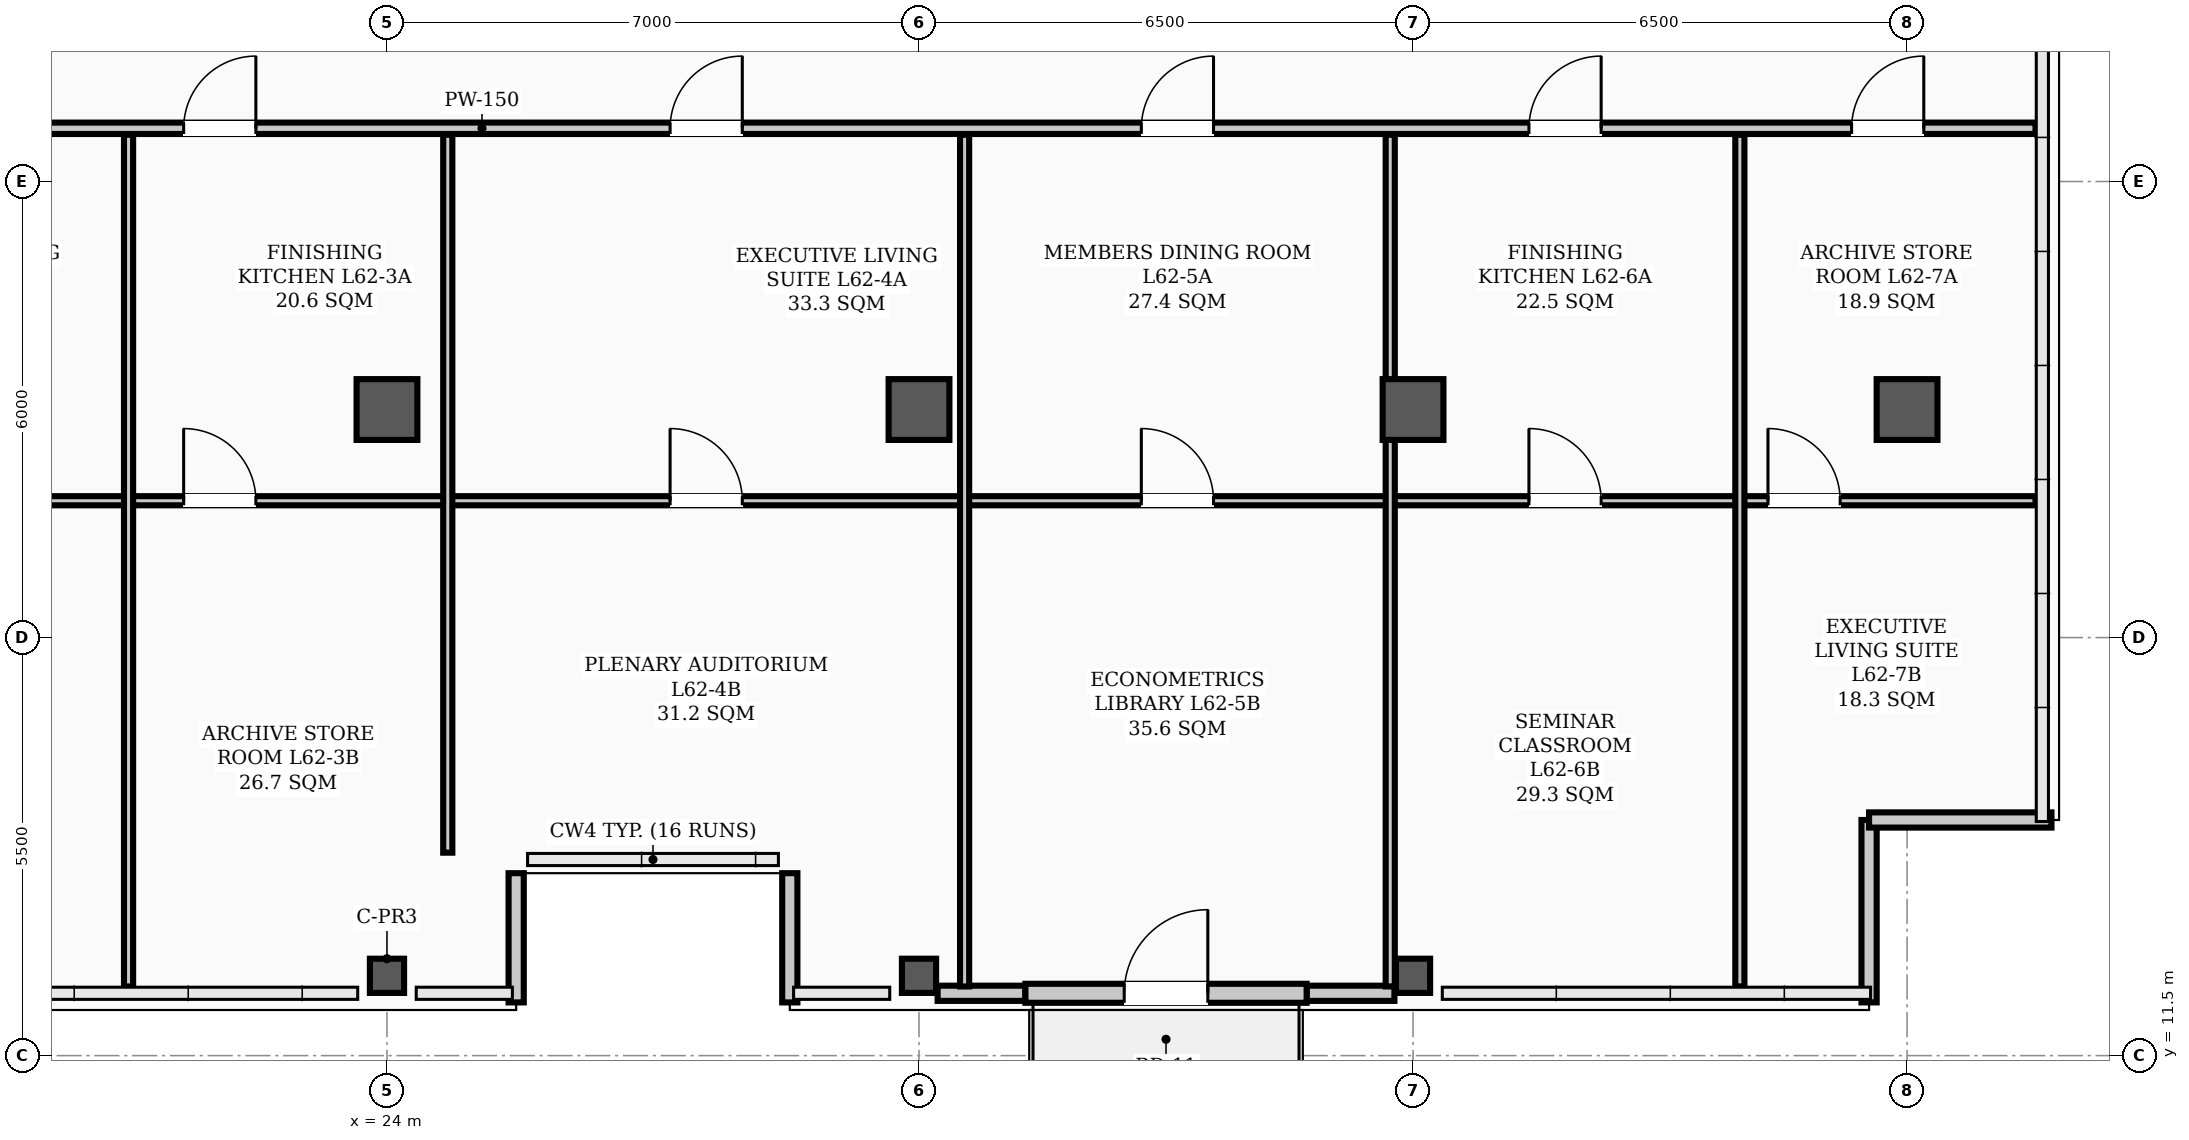
"""IFC4 building model, lengths in metres.
Left out: names, types, materials, properties, quantities, classifications, styles, units other than length and angle.
Written with IfcOpenShell. Run it as: python <this file> out.ifc"""

import sys

from ifc_helpers import new_model, si_unit, direction, frame, frame_2d, origin, origin_2d, place, context, subcontext, project, spatial, rectangle, hollow_rectangle, extrude, element, fill, save


model = new_model("IFC4")
c1 = context("Model", 3, precision=1e-05, world=origin(), true_north=direction((0.0, 1.0)))
c2 = subcontext(c1, "Body", "Model", "MODEL_VIEW")
j1 = project(units=[si_unit("LENGTHUNIT", "METRE"), si_unit("PLANEANGLEUNIT", "RADIAN")], contexts=[c1])
p1 = place(None, origin())
s1 = spatial("IfcSite", under=j1, at=p1, CompositionType="ELEMENT")
p2 = place(p1, origin())
s2 = spatial("IfcBuilding", under=s1, at=p2, CompositionType="ELEMENT")
p3 = place(p2, frame((0.0, 0.0, 250.1)))
s3 = spatial("IfcBuildingStorey", under=s2, at=p3, CompositionType="ELEMENT", Elevation=250.1)
for number, where, z_axis, x_axis in (
    (1, (24.0, 20.0, 0.0), (0.0, 0.0, 1.0), (1.0, 0.0, 0.0)),
    (2, (31.0, 20.0, 0.0), (0.0, 0.0, 1.0), (1.0, 0.0, 0.0)),
    (3, (37.5, 20.0, 0.0), (0.0, 0.0, 1.0), (1.0, 0.0, 0.0)),
    (4, (44.0, 20.0, 0.0), (0.0, 0.0, 1.0), (1.0, 0.0, 0.0)),
):
    element("IfcColumn", number, at=place(p3, frame(where, z_axis=z_axis, x_axis=x_axis)), inside=s3, PredefinedType="COLUMN", context=c2, shape_type="SweptSolid", body=[
        extrude(hollow_rectangle(XDim=0.8, YDim=0.8, WallThickness=0.032, InnerFilletRadius=0.016, OuterFilletRadius=0.048, at=origin_2d()), origin(), (0.0, 0.0, 1.0), 3.9),
    ])
for number, where, z_axis, x_axis in (
    (5, (24.0, 12.55, 0.0), (0.0, 0.0, 1.0), (1.0, 0.0, 0.0)),
    (6, (31.0, 12.55, 0.0), (0.0, 0.0, 1.0), (1.0, 0.0, 0.0)),
    (7, (37.5, 12.55, 0.0), (0.0, 0.0, 1.0), (1.0, 0.0, 0.0)),
):
    element("IfcColumn", number, at=place(p3, frame(where, z_axis=z_axis, x_axis=x_axis)), inside=s3, PredefinedType="COLUMN", context=c2, shape_type="SweptSolid", body=[
        extrude(hollow_rectangle(XDim=0.45, YDim=0.45, WallThickness=0.022, InnerFilletRadius=0.022, OuterFilletRadius=0.044, at=origin_2d()), origin(), (0.0, 0.0, 1.0), 3.9),
    ])
for number, where, z_axis, x_axis in (
    (8, (31.245, 12.32, 0.0), (0.0, 0.0, 1.0), (1.0, 0.0, 0.0)),
    (9, (36.1, 12.32, 0.0), (0.0, 0.0, 1.0), (1.0, 0.0, 0.0)),
):
    element("IfcWall", number, at=place(p3, frame(where, z_axis=z_axis, x_axis=x_axis)), inside=s3, PredefinedType="PARAPET", context=c2, shape_type="SweptSolid", body=[
        extrude(rectangle(XDim=1.155, YDim=0.2, at=frame_2d((0.577, 0.0))), origin(), (0.0, 0.0, 1.0), 1.2),
    ])
p4 = place(p3, frame((43.5, 12.2, 0.0), z_axis=(0.0, 0.0, 1.0), x_axis=(0.0, 1.0, 0.0)))
e10 = element("IfcWall", 10, at=p4, inside=s3, PredefinedType="PARAPET", context=c2, shape_type="SweptSolid", body=[
    extrude(rectangle(XDim=2.4, YDim=0.2, at=frame_2d((1.2, 0.0))), origin(), (0.0, 0.0, 1.0), 1.2),
])
p5 = place(p3, frame((43.5, 14.6, 0.0), z_axis=(0.0, 0.0, 1.0), x_axis=(1.0, 0.0, 0.0)))
e11 = element("IfcWall", 11, at=p5, inside=s3, PredefinedType="PARAPET", context=c2, shape_type="SweptSolid", body=[
    extrude(rectangle(XDim=2.4, YDim=0.2, at=frame_2d((1.2, 0.0))), origin(), (0.0, 0.0, 1.0), 1.2),
])
for number, where, z_axis, x_axis in (
    (12, (25.7, 12.2, 0.0), (0.0, 0.0, 1.0), (0.0, 1.0, 0.0)),
    (13, (29.3, 13.9, 0.0), (0.0, 0.0, 1.0), (0.0, -1.0, 0.0)),
):
    element("IfcWall", number, at=place(p3, frame(where, z_axis=z_axis, x_axis=x_axis)), inside=s3, PredefinedType="PARAPET", context=c2, shape_type="SweptSolid", body=[
        extrude(rectangle(XDim=1.7, YDim=0.2, at=frame_2d((0.85, 0.0))), origin(), (0.0, 0.0, 1.0), 1.2),
    ])
p6 = place(p3, frame((32.4, 12.32, 0.0), z_axis=(0.0, 0.0, 1.0), x_axis=(1.0, 0.0, 0.0)))
e14 = element("IfcWall", 14, at=p6, inside=s3, PredefinedType="STANDARD", context=c2, shape_type="SweptSolid", body=[
    extrude(rectangle(XDim=3.7, YDim=0.25, at=frame_2d((1.85, 0.0))), origin(), (0.0, 0.0, 1.0), 3.18),
])
p7 = place(p6, frame((1.3, 0.0, 0.0)))
e15 = element("IfcOpeningElement", 15, at=p7, cuts=e14, PredefinedType="OPENING", context=c2, shape_type="SweptSolid", body=[
    extrude(rectangle(XDim=1.1, YDim=2.2, at=frame_2d((0.55, 1.1))), frame((0.0, 0.135, 0.0), z_axis=(0.0, -1.0, 0.0), x_axis=(1.0, 0.0, 0.0)), (0.0, 0.0, 1.0), 0.27),
])
p8 = place(p3, frame((4.81, 23.7, 0.0), z_axis=(0.0, 0.0, 1.0), x_axis=(1.0, 0.0, 0.0)))
e16 = element("IfcWall", 16, at=p8, inside=s3, PredefinedType="PARTITIONING", context=c2, shape_type="SweptSolid", body=[
    extrude(rectangle(XDim=40.88, YDim=0.15, at=frame_2d((20.44, 0.0))), origin(), (0.0, 0.0, 1.0), 3.2),
])
p9 = place(p8, frame((5.865, 0.0, 0.0)))
e17 = element("IfcOpeningElement", 17, at=p9, cuts=e16, PredefinedType="OPENING", context=c2, shape_type="SweptSolid", body=[
    extrude(rectangle(XDim=0.95, YDim=2.08, at=frame_2d((0.475, 1.04))), frame((0.0, 0.085, 0.0), z_axis=(0.0, -1.0, 0.0), x_axis=(1.0, 0.0, 0.0)), (0.0, 0.0, 1.0), 0.17),
])
p10 = place(p8, frame((13.115, 0.0, 0.0)))
e18 = element("IfcOpeningElement", 18, at=p10, cuts=e16, PredefinedType="OPENING", context=c2, shape_type="SweptSolid", body=[
    extrude(rectangle(XDim=0.95, YDim=2.08, at=frame_2d((0.475, 1.04))), frame((0.0, 0.085, 0.0), z_axis=(0.0, -1.0, 0.0), x_axis=(1.0, 0.0, 0.0)), (0.0, 0.0, 1.0), 0.17),
])
p11 = place(p8, frame((16.515, 0.0, 0.0)))
e19 = element("IfcOpeningElement", 19, at=p11, cuts=e16, PredefinedType="OPENING", context=c2, shape_type="SweptSolid", body=[
    extrude(rectangle(XDim=0.95, YDim=2.08, at=frame_2d((0.475, 1.04))), frame((0.0, 0.085, 0.0), z_axis=(0.0, -1.0, 0.0), x_axis=(1.0, 0.0, 0.0)), (0.0, 0.0, 1.0), 0.17),
])
p12 = place(p8, frame((22.915, 0.0, 0.0)))
e20 = element("IfcOpeningElement", 20, at=p12, cuts=e16, PredefinedType="OPENING", context=c2, shape_type="SweptSolid", body=[
    extrude(rectangle(XDim=0.95, YDim=2.08, at=frame_2d((0.475, 1.04))), frame((0.0, 0.085, 0.0), z_axis=(0.0, -1.0, 0.0), x_axis=(1.0, 0.0, 0.0)), (0.0, 0.0, 1.0), 0.17),
])
p13 = place(p8, frame((29.115, 0.0, 0.0)))
e21 = element("IfcOpeningElement", 21, at=p13, cuts=e16, PredefinedType="OPENING", context=c2, shape_type="SweptSolid", body=[
    extrude(rectangle(XDim=0.95, YDim=2.08, at=frame_2d((0.475, 1.04))), frame((0.0, 0.085, 0.0), z_axis=(0.0, -1.0, 0.0), x_axis=(1.0, 0.0, 0.0)), (0.0, 0.0, 1.0), 0.17),
])
p14 = place(p8, frame((34.215, 0.0, 0.0)))
e22 = element("IfcOpeningElement", 22, at=p14, cuts=e16, PredefinedType="OPENING", context=c2, shape_type="SweptSolid", body=[
    extrude(rectangle(XDim=0.95, YDim=2.08, at=frame_2d((0.475, 1.04))), frame((0.0, 0.085, 0.0), z_axis=(0.0, -1.0, 0.0), x_axis=(1.0, 0.0, 0.0)), (0.0, 0.0, 1.0), 0.17),
])
p15 = place(p8, frame((38.46, 0.0, 0.0)))
e23 = element("IfcOpeningElement", 23, at=p15, cuts=e16, PredefinedType="OPENING", context=c2, shape_type="SweptSolid", body=[
    extrude(rectangle(XDim=0.95, YDim=2.08, at=frame_2d((0.475, 1.04))), frame((0.0, 0.085, 0.0), z_axis=(0.0, -1.0, 0.0), x_axis=(1.0, 0.0, 0.0)), (0.0, 0.0, 1.0), 0.17),
])
p16 = place(p3, frame((16.2, 18.8, 0.0), z_axis=(0.0, 0.0, 1.0), x_axis=(1.0, 0.0, 0.0)))
e24 = element("IfcWall", 24, at=p16, inside=s3, PredefinedType="PARTITIONING", context=c2, shape_type="SweptSolid", body=[
    extrude(rectangle(XDim=4.4, YDim=0.12, at=frame_2d((2.2, 0.0))), origin(), (0.0, 0.0, 1.0), 3.35),
])
p17 = place(p16, frame((1.725, 0.0, 0.0)))
e25 = element("IfcOpeningElement", 25, at=p17, cuts=e24, PredefinedType="OPENING", context=c2, shape_type="SweptSolid", body=[
    extrude(rectangle(XDim=0.95, YDim=2.08, at=frame_2d((0.475, 1.04))), frame((0.0, 0.07, 0.0), z_axis=(0.0, -1.0, 0.0), x_axis=(1.0, 0.0, 0.0)), (0.0, 0.0, 1.0), 0.14),
])
p18 = place(p3, frame((20.6, 18.8, 0.0), z_axis=(0.0, 0.0, 1.0), x_axis=(1.0, 0.0, 0.0)))
e26 = element("IfcWall", 26, at=p18, inside=s3, PredefinedType="PARTITIONING", context=c2, shape_type="SweptSolid", body=[
    extrude(rectangle(XDim=4.2, YDim=0.12, at=frame_2d((2.1, 0.0))), origin(), (0.0, 0.0, 1.0), 3.2),
])
p19 = place(p18, frame((0.725, 0.0, 0.0)))
e27 = element("IfcOpeningElement", 27, at=p19, cuts=e26, PredefinedType="OPENING", context=c2, shape_type="SweptSolid", body=[
    extrude(rectangle(XDim=0.95, YDim=2.08, at=frame_2d((0.475, 1.04))), frame((0.0, 0.07, 0.0), z_axis=(0.0, -1.0, 0.0), x_axis=(1.0, 0.0, 0.0)), (0.0, 0.0, 1.0), 0.14),
])
p20 = place(p3, frame((24.8, 18.8, 0.0), z_axis=(0.0, 0.0, 1.0), x_axis=(1.0, 0.0, 0.0)))
e28 = element("IfcWall", 28, at=p20, inside=s3, PredefinedType="PARTITIONING", context=c2, shape_type="SweptSolid", body=[
    extrude(rectangle(XDim=6.8, YDim=0.12, at=frame_2d((3.4, 0.0))), origin(), (0.0, 0.0, 1.0), 3.2),
])
p21 = place(p20, frame((2.925, 0.0, 0.0)))
e29 = element("IfcOpeningElement", 29, at=p21, cuts=e28, PredefinedType="OPENING", context=c2, shape_type="SweptSolid", body=[
    extrude(rectangle(XDim=0.95, YDim=2.08, at=frame_2d((0.475, 1.04))), frame((0.0, 0.07, 0.0), z_axis=(0.0, -1.0, 0.0), x_axis=(1.0, 0.0, 0.0)), (0.0, 0.0, 1.0), 0.14),
])
p22 = place(p3, frame((31.6, 18.8, 0.0), z_axis=(0.0, 0.0, 1.0), x_axis=(1.0, 0.0, 0.0)))
e30 = element("IfcWall", 30, at=p22, inside=s3, PredefinedType="PARTITIONING", context=c2, shape_type="SweptSolid", body=[
    extrude(rectangle(XDim=5.6, YDim=0.12, at=frame_2d((2.8, 0.0))), origin(), (0.0, 0.0, 1.0), 3.2),
])
p23 = place(p22, frame((2.325, 0.0, 0.0)))
e31 = element("IfcOpeningElement", 31, at=p23, cuts=e30, PredefinedType="OPENING", context=c2, shape_type="SweptSolid", body=[
    extrude(rectangle(XDim=0.95, YDim=2.08, at=frame_2d((0.475, 1.04))), frame((0.0, 0.07, 0.0), z_axis=(0.0, -1.0, 0.0), x_axis=(1.0, 0.0, 0.0)), (0.0, 0.0, 1.0), 0.14),
])
p24 = place(p3, frame((37.2, 18.8, 0.0), z_axis=(0.0, 0.0, 1.0), x_axis=(1.0, 0.0, 0.0)))
e32 = element("IfcWall", 32, at=p24, inside=s3, PredefinedType="PARTITIONING", context=c2, shape_type="SweptSolid", body=[
    extrude(rectangle(XDim=4.6, YDim=0.12, at=frame_2d((2.3, 0.0))), origin(), (0.0, 0.0, 1.0), 3.2),
])
p25 = place(p24, frame((1.825, 0.0, 0.0)))
e33 = element("IfcOpeningElement", 33, at=p25, cuts=e32, PredefinedType="OPENING", context=c2, shape_type="SweptSolid", body=[
    extrude(rectangle(XDim=0.95, YDim=2.08, at=frame_2d((0.475, 1.04))), frame((0.0, 0.07, 0.0), z_axis=(0.0, -1.0, 0.0), x_axis=(1.0, 0.0, 0.0)), (0.0, 0.0, 1.0), 0.14),
])
p26 = place(p3, frame((41.8, 18.8, 0.0), z_axis=(0.0, 0.0, 1.0), x_axis=(1.0, 0.0, 0.0)))
e34 = element("IfcWall", 34, at=p26, inside=s3, PredefinedType="PARTITIONING", context=c2, shape_type="SweptSolid", body=[
    extrude(rectangle(XDim=3.89, YDim=0.12, at=frame_2d((1.945, 0.0))), origin(), (0.0, 0.0, 1.0), 3.72),
])
p27 = place(p26, frame((0.37, 0.0, 0.0)))
e35 = element("IfcOpeningElement", 35, at=p27, cuts=e34, PredefinedType="OPENING", context=c2, shape_type="SweptSolid", body=[
    extrude(rectangle(XDim=0.95, YDim=2.08, at=frame_2d((0.475, 1.04))), frame((0.0, 0.07, 0.0), z_axis=(0.0, -1.0, 0.0), x_axis=(1.0, 0.0, 0.0)), (0.0, 0.0, 1.0), 0.14),
])
p28 = place(p3, frame((20.6, 12.41, 0.0), z_axis=(0.0, 0.0, 1.0), x_axis=(0.0, 1.0, 0.0)))
e36 = element("IfcWall", 36, at=p28, inside=s3, PredefinedType="PARTITIONING", context=c2, shape_type="SweptSolid", body=[
    extrude(rectangle(XDim=11.205, YDim=0.12, at=frame_2d((5.603, 0.0))), origin(), (0.0, 0.0, 1.0), 3.1),
])
p29 = place(p3, frame((24.8, 14.17, 0.0), z_axis=(0.0, 0.0, 1.0), x_axis=(0.0, 1.0, 0.0)))
e37 = element("IfcWall", 37, at=p29, inside=s3, PredefinedType="PARTITIONING", context=c2, shape_type="SweptSolid", body=[
    extrude(rectangle(XDim=9.445, YDim=0.12, at=frame_2d((4.723, 0.0))), origin(), (0.0, 0.0, 1.0), 3.1),
])
for number, where, z_axis, x_axis in (
    (38, (31.6, 12.41, 0.0), (0.0, 0.0, 1.0), (0.0, 1.0, 0.0)),
    (39, (37.2, 12.41, 0.0), (0.0, 0.0, 1.0), (0.0, 1.0, 0.0)),
):
    element("IfcWall", number, at=place(p3, frame(where, z_axis=z_axis, x_axis=x_axis)), inside=s3, PredefinedType="PARTITIONING", context=c2, shape_type="SweptSolid", body=[
        extrude(rectangle(XDim=11.205, YDim=0.12, at=frame_2d((5.603, 0.0))), origin(), (0.0, 0.0, 1.0), 3.1),
    ])
p30 = place(p3, frame((41.8, 12.41, 0.0), z_axis=(0.0, 0.0, 1.0), x_axis=(0.0, 1.0, 0.0)))
e40 = element("IfcWall", 40, at=p30, inside=s3, PredefinedType="PARTITIONING", context=c2, shape_type="SweptSolid", body=[
    extrude(rectangle(XDim=11.205, YDim=0.12, at=frame_2d((5.603, 0.0))), origin(), (0.0, 0.0, 1.0), 3.72),
])
p31 = place(p7, origin())
e41 = element("IfcDoor", 41, at=p31, inside=s3, OperationType="SINGLE_SWING_RIGHT", PredefinedType="DOOR", context=c2, shape_type="SweptSolid", body=[
    extrude(rectangle(XDim=1.1, YDim=2.2, at=frame_2d((0.55, 1.1))), frame((0.0, 0.025, 0.0), z_axis=(0.0, -1.0, 0.0), x_axis=(1.0, 0.0, 0.0)), (0.0, 0.0, 1.0), 0.05),
])
fill(e15, e41)
p32 = place(p19, origin())
e42 = element("IfcDoor", 42, at=p32, inside=s3, OperationType="SINGLE_SWING_LEFT", PredefinedType="DOOR", context=c2, shape_type="SweptSolid", body=[
    extrude(rectangle(XDim=0.95, YDim=2.08, at=frame_2d((0.475, 1.04))), frame((0.0, 0.025, 0.0), z_axis=(0.0, -1.0, 0.0), x_axis=(1.0, 0.0, 0.0)), (0.0, 0.0, 1.0), 0.05),
])
fill(e27, e42)
p33 = place(p11, origin())
e43 = element("IfcDoor", 43, at=p33, inside=s3, OperationType="SINGLE_SWING_RIGHT", PredefinedType="DOOR", context=c2, shape_type="SweptSolid", body=[
    extrude(rectangle(XDim=0.95, YDim=2.08, at=frame_2d((0.475, 1.04))), frame((0.0, 0.025, 0.0), z_axis=(0.0, -1.0, 0.0), x_axis=(1.0, 0.0, 0.0)), (0.0, 0.0, 1.0), 0.05),
])
fill(e19, e43)
p34 = place(p21, origin())
e44 = element("IfcDoor", 44, at=p34, inside=s3, OperationType="SINGLE_SWING_LEFT", PredefinedType="DOOR", context=c2, shape_type="SweptSolid", body=[
    extrude(rectangle(XDim=0.95, YDim=2.08, at=frame_2d((0.475, 1.04))), frame((0.0, 0.025, 0.0), z_axis=(0.0, -1.0, 0.0), x_axis=(1.0, 0.0, 0.0)), (0.0, 0.0, 1.0), 0.05),
])
fill(e29, e44)
p35 = place(p12, origin())
e45 = element("IfcDoor", 45, at=p35, inside=s3, OperationType="SINGLE_SWING_RIGHT", PredefinedType="DOOR", context=c2, shape_type="SweptSolid", body=[
    extrude(rectangle(XDim=0.95, YDim=2.08, at=frame_2d((0.475, 1.04))), frame((0.0, 0.025, 0.0), z_axis=(0.0, -1.0, 0.0), x_axis=(1.0, 0.0, 0.0)), (0.0, 0.0, 1.0), 0.05),
])
fill(e20, e45)
p36 = place(p23, origin())
e46 = element("IfcDoor", 46, at=p36, inside=s3, OperationType="SINGLE_SWING_LEFT", PredefinedType="DOOR", context=c2, shape_type="SweptSolid", body=[
    extrude(rectangle(XDim=0.95, YDim=2.08, at=frame_2d((0.475, 1.04))), frame((0.0, 0.025, 0.0), z_axis=(0.0, -1.0, 0.0), x_axis=(1.0, 0.0, 0.0)), (0.0, 0.0, 1.0), 0.05),
])
fill(e31, e46)
p37 = place(p13, origin())
e47 = element("IfcDoor", 47, at=p37, inside=s3, OperationType="SINGLE_SWING_RIGHT", PredefinedType="DOOR", context=c2, shape_type="SweptSolid", body=[
    extrude(rectangle(XDim=0.95, YDim=2.08, at=frame_2d((0.475, 1.04))), frame((0.0, 0.025, 0.0), z_axis=(0.0, -1.0, 0.0), x_axis=(1.0, 0.0, 0.0)), (0.0, 0.0, 1.0), 0.05),
])
fill(e21, e47)
p38 = place(p25, origin())
e48 = element("IfcDoor", 48, at=p38, inside=s3, OperationType="SINGLE_SWING_LEFT", PredefinedType="DOOR", context=c2, shape_type="SweptSolid", body=[
    extrude(rectangle(XDim=0.95, YDim=2.08, at=frame_2d((0.475, 1.04))), frame((0.0, 0.025, 0.0), z_axis=(0.0, -1.0, 0.0), x_axis=(1.0, 0.0, 0.0)), (0.0, 0.0, 1.0), 0.05),
])
fill(e33, e48)
p39 = place(p14, origin())
e49 = element("IfcDoor", 49, at=p39, inside=s3, OperationType="SINGLE_SWING_RIGHT", PredefinedType="DOOR", context=c2, shape_type="SweptSolid", body=[
    extrude(rectangle(XDim=0.95, YDim=2.08, at=frame_2d((0.475, 1.04))), frame((0.0, 0.025, 0.0), z_axis=(0.0, -1.0, 0.0), x_axis=(1.0, 0.0, 0.0)), (0.0, 0.0, 1.0), 0.05),
])
fill(e22, e49)
p40 = place(p27, origin())
e50 = element("IfcDoor", 50, at=p40, inside=s3, OperationType="SINGLE_SWING_LEFT", PredefinedType="DOOR", context=c2, shape_type="SweptSolid", body=[
    extrude(rectangle(XDim=0.95, YDim=2.08, at=frame_2d((0.475, 1.04))), frame((0.0, 0.025, 0.0), z_axis=(0.0, -1.0, 0.0), x_axis=(1.0, 0.0, 0.0)), (0.0, 0.0, 1.0), 0.05),
])
fill(e35, e50)
p41 = place(p15, origin())
e51 = element("IfcDoor", 51, at=p41, inside=s3, OperationType="SINGLE_SWING_RIGHT", PredefinedType="DOOR", context=c2, shape_type="SweptSolid", body=[
    extrude(rectangle(XDim=0.95, YDim=2.08, at=frame_2d((0.475, 1.04))), frame((0.0, 0.025, 0.0), z_axis=(0.0, -1.0, 0.0), x_axis=(1.0, 0.0, 0.0)), (0.0, 0.0, 1.0), 0.05),
])
fill(e23, e51)
save(model, sys.argv[1])
